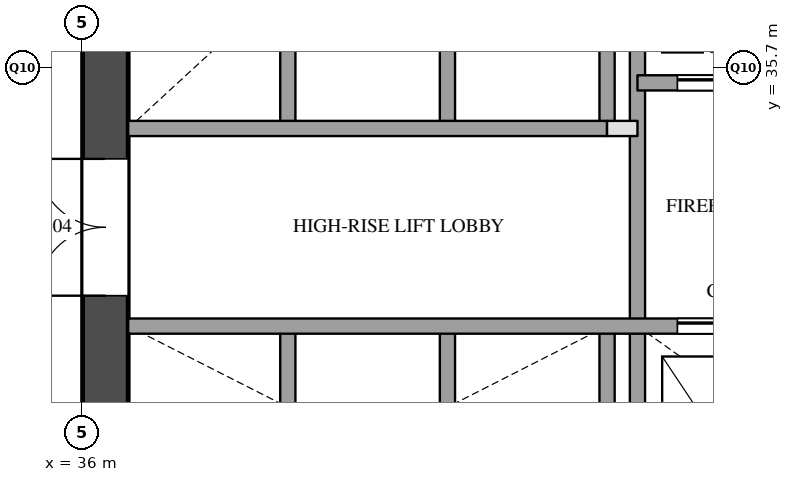
"""IFC4 building model, lengths in metres.
Left out: names, types, materials, properties, quantities, classifications, styles, units other than length and angle.
Written with IfcOpenShell. Run it as: python <this file> out.ifc"""

import sys

from ifc_helpers import new_model, si_unit, direction, frame, frame_2d, origin, place, context, subcontext, project, spatial, rectangle, extrude, element, fill, save


model = new_model("IFC4")
c1 = context("Model", 3, precision=1e-05, world=origin(), true_north=direction((0.0, 1.0)))
c2 = subcontext(c1, "Body", "Model", "MODEL_VIEW")
j1 = project(units=[si_unit("LENGTHUNIT", "METRE"), si_unit("PLANEANGLEUNIT", "RADIAN")], contexts=[c1])
p1 = place(None, origin())
s1 = spatial("IfcSite", under=j1, at=p1, CompositionType="ELEMENT")
p2 = place(p1, origin())
s2 = spatial("IfcBuilding", under=s1, at=p2, CompositionType="ELEMENT")
p3 = place(p2, frame((0.0, 0.0, 89.2)))
s3 = spatial("IfcBuildingStorey", under=s2, at=p3, CompositionType="ELEMENT", Elevation=89.2)
p4 = place(p3, frame((36.3, 29.1, 0.0), z_axis=(0.0, 0.0, 1.0), x_axis=(0.0, 1.0, 0.0)))
e1 = element("IfcWall", 1, at=p4, inside=s3, PredefinedType="SHEAR", context=c2, shape_type="SweptSolid", body=[
    extrude(rectangle(XDim=20.3, YDim=0.6, at=frame_2d((10.15, 0.0))), origin(), (0.0, 0.0, 1.0), 3.5),
])
p5 = place(p4, frame((3.6, 0.0, 0.0)))
e2 = element("IfcOpeningElement", 2, at=p5, cuts=e1, PredefinedType="OPENING", context=c2, shape_type="SweptSolid", body=[
    extrude(rectangle(XDim=1.8, YDim=2.1, at=frame_2d((0.9, 1.05))), frame((0.0, 0.31, 0.0), z_axis=(0.0, -1.0, 0.0), x_axis=(1.0, 0.0, 0.0)), (0.0, 0.0, 1.0), 0.62),
])
p6 = place(p4, frame((16.4, 0.0, 0.0)))
e3 = element("IfcOpeningElement", 3, at=p6, cuts=e1, PredefinedType="OPENING", context=c2, shape_type="SweptSolid", body=[
    extrude(rectangle(XDim=1.0, YDim=2.1, at=frame_2d((0.5, 1.05))), frame((0.0, 0.31, 0.0), z_axis=(0.0, -1.0, 0.0), x_axis=(1.0, 0.0, 0.0)), (0.0, 0.0, 1.0), 0.62),
])
p7 = place(p3, frame((38.7, 29.1, 0.0), z_axis=(0.0, 0.0, 1.0), x_axis=(0.0, 1.0, 0.0)))
e4 = element("IfcWall", 4, at=p7, inside=s3, PredefinedType="SOLIDWALL", context=c2, shape_type="SweptSolid", body=[
    extrude(rectangle(XDim=3.2, YDim=0.2, at=frame_2d((1.6, 0.0))), origin(), (0.0, 0.0, 1.0), 3.5),
])
p8 = place(p3, frame((38.7, 34.9, 0.0), z_axis=(0.0, 0.0, 1.0), x_axis=(0.0, 1.0, 0.0)))
e5 = element("IfcWall", 5, at=p8, inside=s3, PredefinedType="SOLIDWALL", context=c2, shape_type="SweptSolid", body=[
    extrude(rectangle(XDim=3.2, YDim=0.2, at=frame_2d((1.6, 0.0))), origin(), (0.0, 0.0, 1.0), 3.5),
])
p9 = place(p3, frame((40.8, 29.1, 0.0), z_axis=(0.0, 0.0, 1.0), x_axis=(0.0, 1.0, 0.0)))
e6 = element("IfcWall", 6, at=p9, inside=s3, PredefinedType="SOLIDWALL", context=c2, shape_type="SweptSolid", body=[
    extrude(rectangle(XDim=3.2, YDim=0.2, at=frame_2d((1.6, 0.0))), origin(), (0.0, 0.0, 1.0), 3.5),
])
p10 = place(p3, frame((40.8, 34.9, 0.0), z_axis=(0.0, 0.0, 1.0), x_axis=(0.0, 1.0, 0.0)))
e7 = element("IfcWall", 7, at=p10, inside=s3, PredefinedType="SOLIDWALL", context=c2, shape_type="SweptSolid", body=[
    extrude(rectangle(XDim=3.2, YDim=0.2, at=frame_2d((1.6, 0.0))), origin(), (0.0, 0.0, 1.0), 3.5),
])
p11 = place(p3, frame((42.9, 29.1, 0.0), z_axis=(0.0, 0.0, 1.0), x_axis=(0.0, 1.0, 0.0)))
e8 = element("IfcWall", 8, at=p11, inside=s3, PredefinedType="SOLIDWALL", context=c2, shape_type="SweptSolid", body=[
    extrude(rectangle(XDim=3.2, YDim=0.2, at=frame_2d((1.6, 0.0))), origin(), (0.0, 0.0, 1.0), 3.5),
])
p12 = place(p3, frame((42.9, 34.9, 0.0), z_axis=(0.0, 0.0, 1.0), x_axis=(0.0, 1.0, 0.0)))
e9 = element("IfcWall", 9, at=p12, inside=s3, PredefinedType="SOLIDWALL", context=c2, shape_type="SweptSolid", body=[
    extrude(rectangle(XDim=3.2, YDim=0.2, at=frame_2d((1.6, 0.0))), origin(), (0.0, 0.0, 1.0), 3.5),
])
p13 = place(p3, frame((43.3, 29.1, 0.0), z_axis=(0.0, 0.0, 1.0), x_axis=(0.0, 1.0, 0.0)))
e10 = element("IfcWall", 10, at=p13, inside=s3, PredefinedType="SOLIDWALL", context=c2, shape_type="SweptSolid", body=[
    extrude(rectangle(XDim=9.9, YDim=0.2, at=frame_2d((4.95, 0.0))), origin(), (0.0, 0.0, 1.0), 3.5),
])
p14 = place(p3, frame((36.6, 32.3, 0.0), z_axis=(0.0, 0.0, 1.0), x_axis=(1.0, 0.0, 0.0)))
e11 = element("IfcWall", 11, at=p14, inside=s3, PredefinedType="SOLIDWALL", context=c2, shape_type="SweptSolid", body=[
    extrude(rectangle(XDim=11.2, YDim=0.2, at=frame_2d((5.6, 0.0))), origin(), (0.0, 0.0, 1.0), 3.5),
])
p15 = place(p14, frame((7.225, 0.0, 0.0)))
e12 = element("IfcOpeningElement", 12, at=p15, cuts=e11, PredefinedType="OPENING", context=c2, shape_type="SweptSolid", body=[
    extrude(rectangle(XDim=1.2, YDim=2.1, at=frame_2d((0.6, 1.05))), frame((0.0, 0.11, 0.0), z_axis=(0.0, -1.0, 0.0), x_axis=(1.0, 0.0, 0.0)), (0.0, 0.0, 1.0), 0.22),
])
p16 = place(p14, frame((9.475, 0.0, 0.0)))
e13 = element("IfcOpeningElement", 13, at=p16, cuts=e11, PredefinedType="OPENING", context=c2, shape_type="SweptSolid", body=[
    extrude(rectangle(XDim=1.2, YDim=2.1, at=frame_2d((0.6, 1.05))), frame((0.0, 0.11, 0.0), z_axis=(0.0, -1.0, 0.0), x_axis=(1.0, 0.0, 0.0)), (0.0, 0.0, 1.0), 0.22),
])
p17 = place(p3, frame((42.9, 34.9, 0.0), z_axis=(0.0, 0.0, 1.0), x_axis=(1.0, 0.0, 0.0)))
e14 = element("IfcWall", 14, at=p17, inside=s3, PredefinedType="PARTITIONING", context=c2, shape_type="SweptSolid", body=[
    extrude(rectangle(XDim=0.4, YDim=0.2, at=frame_2d((0.2, 0.0))), origin(), (0.0, 0.0, 1.0), 3.5),
])
p18 = place(p3, frame((36.6, 34.9, 0.0), z_axis=(0.0, 0.0, 1.0), x_axis=(1.0, 0.0, 0.0)))
e15 = element("IfcWall", 15, at=p18, inside=s3, PredefinedType="SOLIDWALL", context=c2, shape_type="SweptSolid", body=[
    extrude(rectangle(XDim=6.3, YDim=0.2, at=frame_2d((3.15, 0.0))), origin(), (0.0, 0.0, 1.0), 3.5),
])
p19 = place(p3, frame((43.3, 35.5, 0.0), z_axis=(0.0, 0.0, 1.0), x_axis=(1.0, 0.0, 0.0)))
e16 = element("IfcWall", 16, at=p19, inside=s3, PredefinedType="SOLIDWALL", context=c2, shape_type="SweptSolid", body=[
    extrude(rectangle(XDim=4.5, YDim=0.2, at=frame_2d((2.25, 0.0))), origin(), (0.0, 0.0, 1.0), 3.5),
])
p20 = place(p19, frame((0.525, 0.0, 0.0)))
e17 = element("IfcOpeningElement", 17, at=p20, cuts=e16, PredefinedType="OPENING", context=c2, shape_type="SweptSolid", body=[
    extrude(rectangle(XDim=1.2, YDim=2.1, at=frame_2d((0.6, 1.05))), frame((0.0, 0.11, 0.0), z_axis=(0.0, -1.0, 0.0), x_axis=(1.0, 0.0, 0.0)), (0.0, 0.0, 1.0), 0.22),
])
p21 = place(p19, frame((3.025, 0.0, 0.0)))
e18 = element("IfcOpeningElement", 18, at=p21, cuts=e16, PredefinedType="OPENING", context=c2, shape_type="SweptSolid", body=[
    extrude(rectangle(XDim=0.7, YDim=2.1, at=frame_2d((0.35, 1.05))), frame((0.0, 0.11, 0.0), z_axis=(0.0, -1.0, 0.0), x_axis=(1.0, 0.0, 0.0)), (0.0, 0.0, 1.0), 0.22),
])
p22 = place(p15, origin())
e19 = element("IfcDoor", 19, at=p22, inside=s3, OperationType="SLIDING_TO_LEFT", PredefinedType="DOOR", context=c2, shape_type="SweptSolid", body=[
    extrude(rectangle(XDim=1.2, YDim=2.1, at=frame_2d((0.6, 1.05))), frame((0.0, 0.025, 0.0), z_axis=(0.0, -1.0, 0.0), x_axis=(1.0, 0.0, 0.0)), (0.0, 0.0, 1.0), 0.05),
])
fill(e12, e19)
p23 = place(p20, origin())
e20 = element("IfcDoor", 20, at=p23, inside=s3, OperationType="SLIDING_TO_LEFT", PredefinedType="DOOR", context=c2, shape_type="SweptSolid", body=[
    extrude(rectangle(XDim=1.2, YDim=2.1, at=frame_2d((0.6, 1.05))), frame((0.0, 0.025, 0.0), z_axis=(0.0, -1.0, 0.0), x_axis=(1.0, 0.0, 0.0)), (0.0, 0.0, 1.0), 0.05),
])
fill(e17, e20)
p24 = place(p5, origin())
e21 = element("IfcDoor", 21, at=p24, inside=s3, OperationType="DOUBLE_DOOR_SINGLE_SWING", PredefinedType="DOOR", context=c2, shape_type="SweptSolid", body=[
    extrude(rectangle(XDim=1.8, YDim=2.1, at=frame_2d((0.9, 1.05))), frame((0.0, 0.025, 0.0), z_axis=(0.0, -1.0, 0.0), x_axis=(1.0, 0.0, 0.0)), (0.0, 0.0, 1.0), 0.05),
])
fill(e2, e21)
save(model, sys.argv[1])
